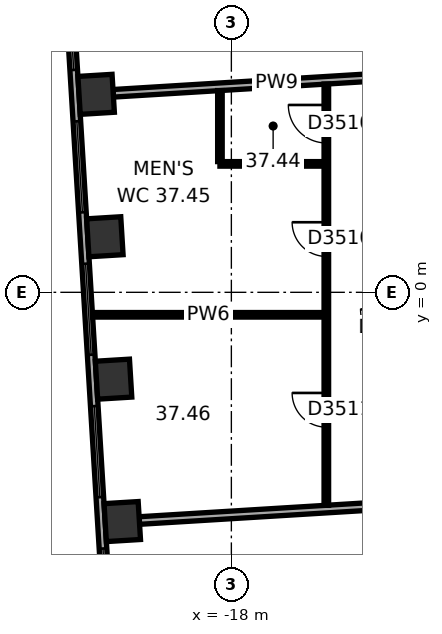
"""IFC4 building model, lengths in metres.
Left out: names, types, materials, properties, quantities, classifications, styles, units other than length and angle.
Written with IfcOpenShell. Run it as: python <this file> out.ifc"""

import sys

from ifc_helpers import new_model, si_unit, direction, frame, frame_2d, origin, origin_2d, place, context, subcontext, project, spatial, rectangle, extrude, element, fill, save


model = new_model("IFC4")
c1 = context("Model", 3, precision=1e-05, world=origin(), true_north=direction((0.0, 1.0)))
c2 = subcontext(c1, "Body", "Model", "MODEL_VIEW")
j1 = project(units=[si_unit("LENGTHUNIT", "METRE"), si_unit("PLANEANGLEUNIT", "RADIAN")], contexts=[c1])
p1 = place(None, origin())
s1 = spatial("IfcSite", under=j1, at=p1, CompositionType="ELEMENT")
p2 = place(p1, origin())
s2 = spatial("IfcBuilding", under=s1, at=p2, CompositionType="ELEMENT")
p3 = place(p2, frame((0.0, 0.0, 154.0)))
s3 = spatial("IfcBuildingStorey", under=s2, at=p3, CompositionType="ELEMENT", Elevation=154.0)
for number, where, z_axis, x_axis in (
    (1, (-21.558, 5.209, 0.0), (0.0, 0.0, 1.0), (0.061, -0.998, 0.0)),
    (2, (-21.329, 1.462, 0.0), (0.0, 0.0, 1.0), (0.061, -0.998, 0.0)),
    (3, (-21.1, -2.285, 0.0), (0.0, 0.0, 1.0), (0.061, -0.998, 0.0)),
    (4, (-20.871, -6.032, 0.0), (0.0, 0.0, 1.0), (0.061, -0.998, 0.0)),
):
    element("IfcColumn", number, at=place(p3, frame(where, z_axis=z_axis, x_axis=x_axis)), inside=s3, PredefinedType="COLUMN", context=c2, shape_type="SweptSolid", body=[
        extrude(rectangle(XDim=1.0, YDim=0.9, at=origin_2d()), origin(), (0.0, 0.0, 1.0), 3.7),
    ])
p4 = place(p3, frame((-22.375, 9.557, 0.0), z_axis=(0.0, 0.0, 1.0), x_axis=(0.061036015339, -0.998135564356, 0.0)))
e5 = element("IfcWall", 5, at=p4, inside=s3, PredefinedType="STANDARD", context=c2, shape_type="SweptSolid", body=[
    extrude(rectangle(XDim=20.044, YDim=0.2, at=frame_2d((10.022, 0.0))), origin(), (0.0, 0.0, 1.0), 3.7),
])
p5 = place(p4, frame((1.313, 0.0, 0.9)))
e6 = element("IfcOpeningElement", 6, at=p5, cuts=e5, PredefinedType="OPENING", context=c2, shape_type="SweptSolid", body=[
    extrude(rectangle(XDim=2.4, YDim=2.0, at=frame_2d((1.2, 1.0))), frame((0.0, 0.11, 0.0), z_axis=(0.0, -1.0, 0.0), x_axis=(1.0, 0.0, 0.0)), (0.0, 0.0, 1.0), 0.22),
])
p6 = place(p4, frame((5.067, 0.0, 0.9)))
e7 = element("IfcOpeningElement", 7, at=p6, cuts=e5, PredefinedType="OPENING", context=c2, shape_type="SweptSolid", body=[
    extrude(rectangle(XDim=2.4, YDim=2.0, at=frame_2d((1.2, 1.0))), frame((0.0, 0.11, 0.0), z_axis=(0.0, -1.0, 0.0), x_axis=(1.0, 0.0, 0.0)), (0.0, 0.0, 1.0), 0.22),
])
p7 = place(p4, frame((8.821, 0.0, 0.9)))
e8 = element("IfcOpeningElement", 8, at=p7, cuts=e5, PredefinedType="OPENING", context=c2, shape_type="SweptSolid", body=[
    extrude(rectangle(XDim=2.4, YDim=2.0, at=frame_2d((1.2, 1.0))), frame((0.0, 0.11, 0.0), z_axis=(0.0, -1.0, 0.0), x_axis=(1.0, 0.0, 0.0)), (0.0, 0.0, 1.0), 0.22),
])
p8 = place(p4, frame((12.575, 0.0, 0.9)))
e9 = element("IfcOpeningElement", 9, at=p8, cuts=e5, PredefinedType="OPENING", context=c2, shape_type="SweptSolid", body=[
    extrude(rectangle(XDim=2.4, YDim=2.0, at=frame_2d((1.2, 1.0))), frame((0.0, 0.11, 0.0), z_axis=(0.0, -1.0, 0.0), x_axis=(1.0, 0.0, 0.0)), (0.0, 0.0, 1.0), 0.22),
])
p9 = place(p4, frame((16.329, 0.0, 0.9)))
e10 = element("IfcOpeningElement", 10, at=p9, cuts=e5, PredefinedType="OPENING", context=c2, shape_type="SweptSolid", body=[
    extrude(rectangle(XDim=2.4, YDim=2.0, at=frame_2d((1.2, 1.0))), frame((0.0, 0.11, 0.0), z_axis=(0.0, -1.0, 0.0), x_axis=(1.0, 0.0, 0.0)), (0.0, 0.0, 1.0), 0.22),
])
p10 = place(p3, frame((-21.654, -0.592, 0.0), z_axis=(0.0, 0.0, 1.0), x_axis=(1.0, 0.0, 0.0)))
e11 = element("IfcWall", 11, at=p10, inside=s3, PredefinedType="PARTITIONING", context=c2, shape_type="SweptSolid", body=[
    extrude(rectangle(XDim=6.093, YDim=0.12, at=frame_2d((3.046, 0.0))), origin(), (0.0, 0.0, 1.0), 3.42),
])
p11 = place(p3, frame((-21.109, 5.237, 0.0), z_axis=(0.0, 0.0, 1.0), x_axis=(0.998135264293, 0.061040922131, 0.0)))
e12 = element("IfcWall", 12, at=p11, inside=s3, PredefinedType="PARTITIONING", context=c2, shape_type="SweptSolid", body=[
    extrude(rectangle(XDim=8.615, YDim=0.2, at=frame_2d((4.308, 0.0))), origin(), (0.0, 0.0, 1.0), 3.42),
])
p12 = place(p3, frame((-20.421, -6.005, 0.0), z_axis=(0.0, 0.0, 1.0), x_axis=(0.998134865741, 0.061047438866, 0.0)))
e13 = element("IfcWall", 13, at=p12, inside=s3, PredefinedType="PARTITIONING", context=c2, shape_type="SweptSolid", body=[
    extrude(rectangle(XDim=7.927, YDim=0.2, at=frame_2d((3.963, 0.0))), origin(), (0.0, 0.0, 1.0), 2.87),
])
p13 = place(p3, frame((-18.301, 3.38, 0.0), z_axis=(0.0, 0.0, 1.0), x_axis=(1.0, 0.0, 0.0)))
e14 = element("IfcWall", 14, at=p13, inside=s3, PredefinedType="PARTITIONING", context=c2, shape_type="SweptSolid", body=[
    extrude(rectangle(XDim=2.74, YDim=0.12, at=frame_2d((1.37, 0.0))), origin(), (0.0, 0.0, 1.0), 3.42),
])
p14 = place(p3, frame((-18.301, 5.308, 0.0), z_axis=(0.0, 0.0, 1.0), x_axis=(0.0, -1.0, 0.0)))
e15 = element("IfcWall", 15, at=p14, inside=s3, PredefinedType="PARTITIONING", context=c2, shape_type="SweptSolid", body=[
    extrude(rectangle(XDim=1.869, YDim=0.12, at=frame_2d((0.934, 0.0))), origin(), (0.0, 0.0, 1.0), 3.42),
])
p15 = place(p3, frame((-15.501, 5.479, 0.0), z_axis=(0.0, 0.0, 1.0), x_axis=(0.0, -1.0, 0.0)))
e16 = element("IfcWall", 16, at=p15, inside=s3, PredefinedType="PARTITIONING", context=c2, shape_type="SweptSolid", body=[
    extrude(rectangle(XDim=11.083, YDim=0.12, at=frame_2d((5.542, 0.0))), origin(), (0.0, 0.0, 1.0), 3.42),
])
p16 = place(p15, frame((0.55, 0.0, 0.0)))
e17 = element("IfcOpeningElement", 17, at=p16, cuts=e16, PredefinedType="OPENING", context=c2, shape_type="SweptSolid", body=[
    extrude(rectangle(XDim=1.0, YDim=2.1, at=frame_2d((0.5, 1.05))), frame((0.0, 0.07, 0.0), z_axis=(0.0, -1.0, 0.0), x_axis=(1.0, 0.0, 0.0)), (0.0, 0.0, 1.0), 0.14),
])
p17 = place(p15, frame((3.636, 0.0, 0.0)))
e18 = element("IfcOpeningElement", 18, at=p17, cuts=e16, PredefinedType="OPENING", context=c2, shape_type="SweptSolid", body=[
    extrude(rectangle(XDim=0.9, YDim=2.1, at=frame_2d((0.45, 1.05))), frame((0.0, 0.07, 0.0), z_axis=(0.0, -1.0, 0.0), x_axis=(1.0, 0.0, 0.0)), (0.0, 0.0, 1.0), 0.14),
])
p18 = place(p15, frame((8.127, 0.0, 0.0)))
e19 = element("IfcOpeningElement", 19, at=p18, cuts=e16, PredefinedType="OPENING", context=c2, shape_type="SweptSolid", body=[
    extrude(rectangle(XDim=0.9, YDim=2.1, at=frame_2d((0.45, 1.05))), frame((0.0, 0.07, 0.0), z_axis=(0.0, -1.0, 0.0), x_axis=(1.0, 0.0, 0.0)), (0.0, 0.0, 1.0), 0.14),
])
p19 = place(p5, origin())
e20 = element("IfcWindow", 20, at=p19, inside=s3, PartitioningType="SINGLE_PANEL", PredefinedType="WINDOW", context=c2, shape_type="SweptSolid", body=[
    extrude(rectangle(XDim=2.4, YDim=2.0, at=frame_2d((1.2, 1.0))), frame((0.0, 0.03, 0.0), z_axis=(0.0, -1.0, 0.0), x_axis=(1.0, 0.0, 0.0)), (0.0, 0.0, 1.0), 0.06),
])
fill(e6, e20)
p20 = place(p6, origin())
e21 = element("IfcWindow", 21, at=p20, inside=s3, PartitioningType="SINGLE_PANEL", PredefinedType="WINDOW", context=c2, shape_type="SweptSolid", body=[
    extrude(rectangle(XDim=2.4, YDim=2.0, at=frame_2d((1.2, 1.0))), frame((0.0, 0.03, 0.0), z_axis=(0.0, -1.0, 0.0), x_axis=(1.0, 0.0, 0.0)), (0.0, 0.0, 1.0), 0.06),
])
fill(e7, e21)
p21 = place(p7, origin())
e22 = element("IfcWindow", 22, at=p21, inside=s3, PartitioningType="SINGLE_PANEL", PredefinedType="WINDOW", context=c2, shape_type="SweptSolid", body=[
    extrude(rectangle(XDim=2.4, YDim=2.0, at=frame_2d((1.2, 1.0))), frame((0.0, 0.03, 0.0), z_axis=(0.0, -1.0, 0.0), x_axis=(1.0, 0.0, 0.0)), (0.0, 0.0, 1.0), 0.06),
])
fill(e8, e22)
p22 = place(p8, origin())
e23 = element("IfcWindow", 23, at=p22, inside=s3, PartitioningType="SINGLE_PANEL", PredefinedType="WINDOW", context=c2, shape_type="SweptSolid", body=[
    extrude(rectangle(XDim=2.4, YDim=2.0, at=frame_2d((1.2, 1.0))), frame((0.0, 0.03, 0.0), z_axis=(0.0, -1.0, 0.0), x_axis=(1.0, 0.0, 0.0)), (0.0, 0.0, 1.0), 0.06),
])
fill(e9, e23)
p23 = place(p9, origin())
e24 = element("IfcWindow", 24, at=p23, inside=s3, PartitioningType="SINGLE_PANEL", PredefinedType="WINDOW", context=c2, shape_type="SweptSolid", body=[
    extrude(rectangle(XDim=2.4, YDim=2.0, at=frame_2d((1.2, 1.0))), frame((0.0, 0.03, 0.0), z_axis=(0.0, -1.0, 0.0), x_axis=(1.0, 0.0, 0.0)), (0.0, 0.0, 1.0), 0.06),
])
fill(e10, e24)
p24 = place(p16, origin())
e25 = element("IfcDoor", 25, at=p24, inside=s3, OperationType="SINGLE_SWING_LEFT", PredefinedType="DOOR", context=c2, shape_type="SweptSolid", body=[
    extrude(rectangle(XDim=1.0, YDim=2.1, at=frame_2d((0.5, 1.05))), frame((0.0, 0.025, 0.0), z_axis=(0.0, -1.0, 0.0), x_axis=(1.0, 0.0, 0.0)), (0.0, 0.0, 1.0), 0.05),
])
fill(e17, e25)
p25 = place(p17, origin())
e26 = element("IfcDoor", 26, at=p25, inside=s3, OperationType="SINGLE_SWING_LEFT", PredefinedType="DOOR", context=c2, shape_type="SweptSolid", body=[
    extrude(rectangle(XDim=0.9, YDim=2.1, at=frame_2d((0.45, 1.05))), frame((0.0, 0.025, 0.0), z_axis=(0.0, -1.0, 0.0), x_axis=(1.0, 0.0, 0.0)), (0.0, 0.0, 1.0), 0.05),
])
fill(e18, e26)
p26 = place(p18, origin())
e27 = element("IfcDoor", 27, at=p26, inside=s3, OperationType="SINGLE_SWING_LEFT", PredefinedType="DOOR", context=c2, shape_type="SweptSolid", body=[
    extrude(rectangle(XDim=0.9, YDim=2.1, at=frame_2d((0.45, 1.05))), frame((0.0, 0.025, 0.0), z_axis=(0.0, -1.0, 0.0), x_axis=(1.0, 0.0, 0.0)), (0.0, 0.0, 1.0), 0.05),
])
fill(e19, e27)
save(model, sys.argv[1])
